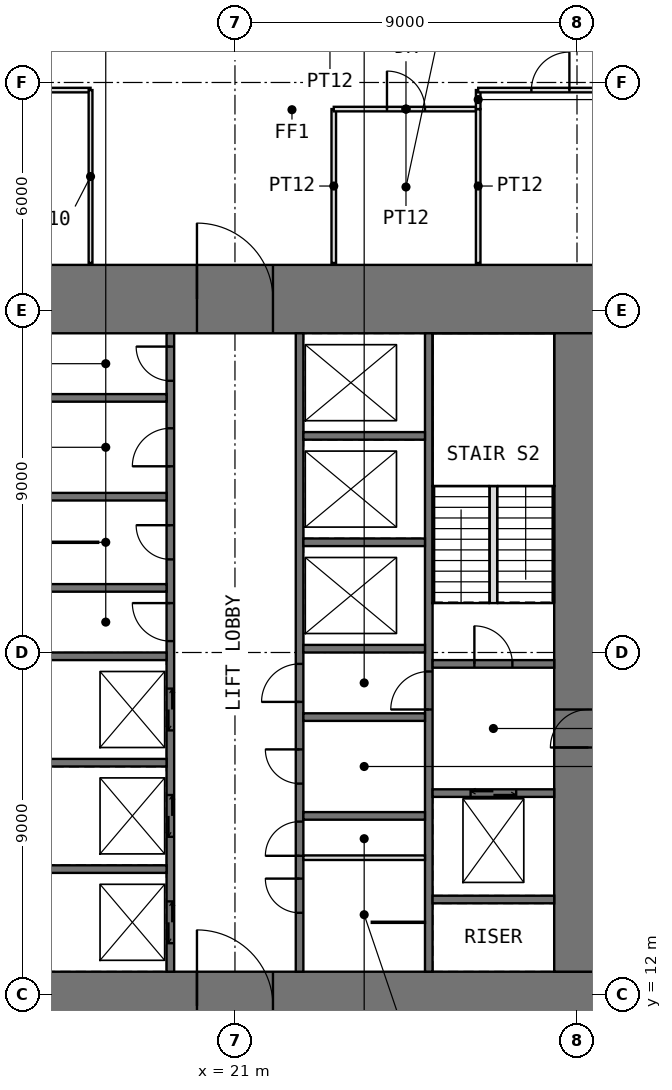
"""IFC4 building model, lengths in metres.
Left out: names, types, materials, properties, quantities, classifications, styles, units other than length and angle.
Written with IfcOpenShell. Run it as: python <this file> out.ifc"""

import sys

from ifc_helpers import new_model, si_unit, direction, frame, frame_2d, origin, place, context, subcontext, project, spatial, rectangle, extrude, element, fill, save


model = new_model("IFC4")
c1 = context("Model", 3, precision=1e-05, world=origin(), true_north=direction((0.0, 1.0)))
c2 = subcontext(c1, "Body", "Model", "MODEL_VIEW")
j1 = project(units=[si_unit("LENGTHUNIT", "METRE"), si_unit("PLANEANGLEUNIT", "RADIAN")], contexts=[c1])
p1 = place(None, origin())
s1 = spatial("IfcSite", under=j1, at=p1, CompositionType="ELEMENT")
p2 = place(p1, origin())
s2 = spatial("IfcBuilding", under=s1, at=p2, CompositionType="ELEMENT")
p3 = place(p2, frame((0.0, 0.0, 82.5)))
s3 = spatial("IfcBuildingStorey", under=s2, at=p3, CompositionType="ELEMENT", Elevation=82.5)
p4 = place(p3, frame((10.8, 11.7, -0.05), z_axis=(0.0, 0.0, 1.0), x_axis=(1.0, 0.0, 0.0)))
e1 = element("IfcWall", 1, at=p4, inside=s3, PredefinedType="SHEAR", context=c2, shape_type="SweptSolid", body=[
    extrude(rectangle(XDim=20.4, YDim=1.8, at=frame_2d((10.2, 0.0))), origin(), (0.0, 0.0, 1.0), 3.8),
])
p5 = place(p4, frame((9.2, 0.0, 0.05)))
e2 = element("IfcOpeningElement", 2, at=p5, cuts=e1, PredefinedType="OPENING", context=c2, shape_type="SweptSolid", body=[
    extrude(rectangle(XDim=2.0, YDim=2.2, at=frame_2d((1.0, 1.1))), frame((0.0, 0.91, 0.0), z_axis=(0.0, -1.0, 0.0), x_axis=(1.0, 0.0, 0.0)), (0.0, 0.0, 1.0), 1.82),
])
p6 = place(p3, frame((10.8, 30.3, -0.05), z_axis=(0.0, 0.0, 1.0), x_axis=(1.0, 0.0, 0.0)))
e3 = element("IfcWall", 3, at=p6, inside=s3, PredefinedType="SHEAR", context=c2, shape_type="SweptSolid", body=[
    extrude(rectangle(XDim=20.4, YDim=1.8, at=frame_2d((10.2, 0.0))), origin(), (0.0, 0.0, 1.0), 3.8),
])
p7 = place(p6, frame((9.2, 0.0, 0.05)))
e4 = element("IfcOpeningElement", 4, at=p7, cuts=e3, PredefinedType="OPENING", context=c2, shape_type="SweptSolid", body=[
    extrude(rectangle(XDim=2.0, YDim=2.2, at=frame_2d((1.0, 1.1))), frame((0.0, 0.91, 0.0), z_axis=(0.0, -1.0, 0.0), x_axis=(1.0, 0.0, 0.0)), (0.0, 0.0, 1.0), 1.82),
])
p8 = place(p3, frame((30.3, 12.6, -0.05), z_axis=(0.0, 0.0, 1.0), x_axis=(0.0, 1.0, 0.0)))
e5 = element("IfcWall", 5, at=p8, inside=s3, PredefinedType="SHEAR", context=c2, shape_type="SweptSolid", body=[
    extrude(rectangle(XDim=16.8, YDim=1.8, at=frame_2d((8.4, 0.0))), origin(), (0.0, 0.0, 1.0), 3.8),
])
p9 = place(p8, frame((5.9, 0.0, 0.05)))
e6 = element("IfcOpeningElement", 6, at=p9, cuts=e5, PredefinedType="OPENING", context=c2, shape_type="SweptSolid", body=[
    extrude(rectangle(XDim=1.0, YDim=2.2, at=frame_2d((0.5, 1.1))), frame((0.0, 0.91, 0.0), z_axis=(0.0, -1.0, 0.0), x_axis=(1.0, 0.0, 0.0)), (0.0, 0.0, 1.0), 1.82),
])
p10 = place(p3, frame((19.3, 12.6, -0.05), z_axis=(0.0, 0.0, 1.0), x_axis=(0.0, 1.0, 0.0)))
e7 = element("IfcWall", 7, at=p10, inside=s3, PredefinedType="SHEAR", context=c2, shape_type="SweptSolid", body=[
    extrude(rectangle(XDim=16.8, YDim=0.2, at=frame_2d((8.4, 0.0))), origin(), (0.0, 0.0, 1.0), 3.8),
])
p11 = place(p10, frame((8.7, 0.0, 0.05)))
e8 = element("IfcOpeningElement", 8, at=p11, cuts=e7, PredefinedType="OPENING", context=c2, shape_type="SweptSolid", body=[
    extrude(rectangle(XDim=1.0, YDim=2.2, at=frame_2d((0.5, 1.1))), frame((0.0, 0.11, 0.0), z_axis=(0.0, -1.0, 0.0), x_axis=(1.0, 0.0, 0.0)), (0.0, 0.0, 1.0), 0.22),
])
p12 = place(p10, frame((10.85, 0.0, 0.05)))
e9 = element("IfcOpeningElement", 9, at=p12, cuts=e7, PredefinedType="OPENING", context=c2, shape_type="SweptSolid", body=[
    extrude(rectangle(XDim=0.9, YDim=2.2, at=frame_2d((0.45, 1.1))), frame((0.0, 0.11, 0.0), z_axis=(0.0, -1.0, 0.0), x_axis=(1.0, 0.0, 0.0)), (0.0, 0.0, 1.0), 0.22),
])
p13 = place(p10, frame((13.3, 0.0, 0.05)))
e10 = element("IfcOpeningElement", 10, at=p13, cuts=e7, PredefinedType="OPENING", context=c2, shape_type="SweptSolid", body=[
    extrude(rectangle(XDim=1.0, YDim=2.2, at=frame_2d((0.5, 1.1))), frame((0.0, 0.11, 0.0), z_axis=(0.0, -1.0, 0.0), x_axis=(1.0, 0.0, 0.0)), (0.0, 0.0, 1.0), 0.22),
])
p14 = place(p10, frame((15.55, 0.0, 0.05)))
e11 = element("IfcOpeningElement", 11, at=p14, cuts=e7, PredefinedType="OPENING", context=c2, shape_type="SweptSolid", body=[
    extrude(rectangle(XDim=0.9, YDim=2.2, at=frame_2d((0.45, 1.1))), frame((0.0, 0.11, 0.0), z_axis=(0.0, -1.0, 0.0), x_axis=(1.0, 0.0, 0.0)), (0.0, 0.0, 1.0), 0.22),
])
p15 = place(p10, frame((0.75, 0.0, 0.05)))
e12 = element("IfcOpeningElement", 12, at=p15, cuts=e7, PredefinedType="OPENING", context=c2, shape_type="SweptSolid", body=[
    extrude(rectangle(XDim=1.1, YDim=2.2, at=frame_2d((0.55, 1.1))), frame((0.0, 0.11, 0.0), z_axis=(0.0, -1.0, 0.0), x_axis=(1.0, 0.0, 0.0)), (0.0, 0.0, 1.0), 0.22),
])
p16 = place(p10, frame((3.55, 0.0, 0.05)))
e13 = element("IfcOpeningElement", 13, at=p16, cuts=e7, PredefinedType="OPENING", context=c2, shape_type="SweptSolid", body=[
    extrude(rectangle(XDim=1.1, YDim=2.2, at=frame_2d((0.55, 1.1))), frame((0.0, 0.11, 0.0), z_axis=(0.0, -1.0, 0.0), x_axis=(1.0, 0.0, 0.0)), (0.0, 0.0, 1.0), 0.22),
])
p17 = place(p10, frame((6.35, 0.0, 0.05)))
e14 = element("IfcOpeningElement", 14, at=p17, cuts=e7, PredefinedType="OPENING", context=c2, shape_type="SweptSolid", body=[
    extrude(rectangle(XDim=1.1, YDim=2.2, at=frame_2d((0.55, 1.1))), frame((0.0, 0.11, 0.0), z_axis=(0.0, -1.0, 0.0), x_axis=(1.0, 0.0, 0.0)), (0.0, 0.0, 1.0), 0.22),
])
p18 = place(p3, frame((22.7, 12.6, -0.05), z_axis=(0.0, 0.0, 1.0), x_axis=(0.0, 1.0, 0.0)))
e15 = element("IfcWall", 15, at=p18, inside=s3, PredefinedType="SHEAR", context=c2, shape_type="SweptSolid", body=[
    extrude(rectangle(XDim=16.8, YDim=0.2, at=frame_2d((8.4, 0.0))), origin(), (0.0, 0.0, 1.0), 3.8),
])
p19 = place(p18, frame((3.05, 0.0, 0.05)))
e16 = element("IfcOpeningElement", 16, at=p19, cuts=e15, PredefinedType="OPENING", context=c2, shape_type="SweptSolid", body=[
    extrude(rectangle(XDim=0.9, YDim=2.2, at=frame_2d((0.45, 1.1))), frame((0.0, 0.11, 0.0), z_axis=(0.0, -1.0, 0.0), x_axis=(1.0, 0.0, 0.0)), (0.0, 0.0, 1.0), 0.22),
])
p20 = place(p18, frame((7.1, 0.0, 0.05)))
e17 = element("IfcOpeningElement", 17, at=p20, cuts=e15, PredefinedType="OPENING", context=c2, shape_type="SweptSolid", body=[
    extrude(rectangle(XDim=1.0, YDim=2.2, at=frame_2d((0.5, 1.1))), frame((0.0, 0.11, 0.0), z_axis=(0.0, -1.0, 0.0), x_axis=(1.0, 0.0, 0.0)), (0.0, 0.0, 1.0), 0.22),
])
p21 = place(p18, frame((1.55, 0.0, 0.05)))
e18 = element("IfcOpeningElement", 18, at=p21, cuts=e15, PredefinedType="OPENING", context=c2, shape_type="SweptSolid", body=[
    extrude(rectangle(XDim=0.9, YDim=2.2, at=frame_2d((0.45, 1.1))), frame((0.0, 0.11, 0.0), z_axis=(0.0, -1.0, 0.0), x_axis=(1.0, 0.0, 0.0)), (0.0, 0.0, 1.0), 0.22),
])
p22 = place(p18, frame((4.95, 0.0, 0.05)))
e19 = element("IfcOpeningElement", 19, at=p22, cuts=e15, PredefinedType="OPENING", context=c2, shape_type="SweptSolid", body=[
    extrude(rectangle(XDim=0.9, YDim=2.2, at=frame_2d((0.45, 1.1))), frame((0.0, 0.11, 0.0), z_axis=(0.0, -1.0, 0.0), x_axis=(1.0, 0.0, 0.0)), (0.0, 0.0, 1.0), 0.22),
])
p23 = place(p3, frame((26.1, 12.6, -0.05), z_axis=(0.0, 0.0, 1.0), x_axis=(0.0, 1.0, 0.0)))
e20 = element("IfcWall", 20, at=p23, inside=s3, PredefinedType="SHEAR", context=c2, shape_type="SweptSolid", body=[
    extrude(rectangle(XDim=16.8, YDim=0.2, at=frame_2d((8.4, 0.0))), origin(), (0.0, 0.0, 1.0), 3.8),
])
p24 = place(p23, frame((6.9, 0.0, 0.05)))
e21 = element("IfcOpeningElement", 21, at=p24, cuts=e20, PredefinedType="OPENING", context=c2, shape_type="SweptSolid", body=[
    extrude(rectangle(XDim=1.0, YDim=2.2, at=frame_2d((0.5, 1.1))), frame((0.0, 0.11, 0.0), z_axis=(0.0, -1.0, 0.0), x_axis=(1.0, 0.0, 0.0)), (0.0, 0.0, 1.0), 0.22),
])
for number, where, z_axis, x_axis in (
    (22, (16.0, 15.3, -0.05), (0.0, 0.0, 1.0), (1.0, 0.0, 0.0)),
    (23, (16.0, 18.1, -0.05), (0.0, 0.0, 1.0), (1.0, 0.0, 0.0)),
    (24, (16.0, 20.9, -0.05), (0.0, 0.0, 1.0), (1.0, 0.0, 0.0)),
    (25, (16.0, 22.7, -0.05), (0.0, 0.0, 1.0), (1.0, 0.0, 0.0)),
    (26, (16.0, 25.1, -0.05), (0.0, 0.0, 1.0), (1.0, 0.0, 0.0)),
    (27, (16.0, 27.7, -0.05), (0.0, 0.0, 1.0), (1.0, 0.0, 0.0)),
    (28, (22.8, 16.7, -0.05), (0.0, 0.0, 1.0), (1.0, 0.0, 0.0)),
    (29, (22.8, 19.3, -0.05), (0.0, 0.0, 1.0), (1.0, 0.0, 0.0)),
    (30, (22.8, 21.1, -0.05), (0.0, 0.0, 1.0), (1.0, 0.0, 0.0)),
    (31, (22.8, 23.9, -0.05), (0.0, 0.0, 1.0), (1.0, 0.0, 0.0)),
    (32, (22.8, 26.7, -0.05), (0.0, 0.0, 1.0), (1.0, 0.0, 0.0)),
    (33, (26.2, 14.5, -0.05), (0.0, 0.0, 1.0), (1.0, 0.0, 0.0)),
):
    element("IfcWall", number, at=place(p3, frame(where, z_axis=z_axis, x_axis=x_axis)), inside=s3, PredefinedType="SHEAR", context=c2, shape_type="SweptSolid", body=[
        extrude(rectangle(XDim=3.2, YDim=0.2, at=frame_2d((1.6, 0.0))), origin(), (0.0, 0.0, 1.0), 3.8),
    ])
p25 = place(p3, frame((26.2, 17.3, -0.05), z_axis=(0.0, 0.0, 1.0), x_axis=(1.0, 0.0, 0.0)))
e34 = element("IfcWall", 34, at=p25, inside=s3, PredefinedType="SHEAR", context=c2, shape_type="SweptSolid", body=[
    extrude(rectangle(XDim=3.2, YDim=0.2, at=frame_2d((1.6, 0.0))), origin(), (0.0, 0.0, 1.0), 3.8),
])
p26 = place(p25, frame((1.0, 0.0, 0.05)))
e35 = element("IfcOpeningElement", 35, at=p26, cuts=e34, PredefinedType="OPENING", context=c2, shape_type="SweptSolid", body=[
    extrude(rectangle(XDim=1.2, YDim=2.2, at=frame_2d((0.6, 1.1))), frame((0.0, 0.11, 0.0), z_axis=(0.0, -1.0, 0.0), x_axis=(1.0, 0.0, 0.0)), (0.0, 0.0, 1.0), 0.22),
])
p27 = place(p3, frame((26.2, 20.7, -0.05), z_axis=(0.0, 0.0, 1.0), x_axis=(1.0, 0.0, 0.0)))
e36 = element("IfcWall", 36, at=p27, inside=s3, PredefinedType="SHEAR", context=c2, shape_type="SweptSolid", body=[
    extrude(rectangle(XDim=3.2, YDim=0.2, at=frame_2d((1.6, 0.0))), origin(), (0.0, 0.0, 1.0), 3.8),
])
p28 = place(p27, frame((1.1, 0.0, 0.05)))
e37 = element("IfcOpeningElement", 37, at=p28, cuts=e36, PredefinedType="OPENING", context=c2, shape_type="SweptSolid", body=[
    extrude(rectangle(XDim=1.0, YDim=2.2, at=frame_2d((0.5, 1.1))), frame((0.0, 0.11, 0.0), z_axis=(0.0, -1.0, 0.0), x_axis=(1.0, 0.0, 0.0)), (0.0, 0.0, 1.0), 0.22),
])
p29 = place(p3, frame((22.8, 15.6, 0.0), z_axis=(0.0, 0.0, 1.0), x_axis=(1.0, 0.0, 0.0)))
e38 = element("IfcWall", 38, at=p29, inside=s3, PredefinedType="PARTITIONING", context=c2, shape_type="SweptSolid", body=[
    extrude(rectangle(XDim=3.2, YDim=0.12, at=frame_2d((1.6, 0.0))), origin(), (0.0, 0.0, 1.0), 3.55),
])
for number, where, z_axis, x_axis in (
    (39, (24.6, 13.9, 0.0), (0.0, 0.0, 1.0), (1.0, 0.0, 0.0)),
    (40, (16.0, 23.9, 0.0), (0.0, 0.0, 1.0), (1.0, 0.0, 0.0)),
):
    element("IfcWall", number, at=place(p3, frame(where, z_axis=z_axis, x_axis=x_axis)), inside=s3, PredefinedType="PARTITIONING", context=c2, shape_type="SweptSolid", body=[
        extrude(rectangle(XDim=1.4, YDim=0.03, at=frame_2d((0.7, 0.0))), origin(), (0.0, 0.0, 1.0), 3.55),
    ])
p30 = place(p3, frame((14.0, 35.8, 0.0), z_axis=(0.0, 0.0, 1.0), x_axis=(1.0, 0.0, 0.0)))
e41 = element("IfcWall", 41, at=p30, inside=s3, PredefinedType="PARTITIONING", context=c2, shape_type="SweptSolid", body=[
    extrude(rectangle(XDim=3.2, YDim=0.12, at=frame_2d((1.6, 0.0))), origin(), (0.0, 0.0, 1.0), 3.55),
])
p31 = place(p30, frame((1.1, 0.0, 0.0)))
e42 = element("IfcOpeningElement", 42, at=p31, cuts=e41, PredefinedType="OPENING", context=c2, shape_type="SweptSolid", body=[
    extrude(rectangle(XDim=1.0, YDim=2.4, at=frame_2d((0.5, 1.2))), frame((0.0, 0.07, 0.0), z_axis=(0.0, -1.0, 0.0), x_axis=(1.0, 0.0, 0.0)), (0.0, 0.0, 1.0), 0.14),
])
p32 = place(p3, frame((17.2, 31.25, 0.0), z_axis=(0.0, 0.0, 1.0), x_axis=(0.0, 1.0, 0.0)))
e43 = element("IfcWall", 43, at=p32, inside=s3, PredefinedType="PARTITIONING", context=c2, shape_type="SweptSolid", body=[
    extrude(rectangle(XDim=4.55, YDim=0.1, at=frame_2d((2.275, 0.0))), origin(), (0.0, 0.0, 1.0), 3.55),
])
p33 = place(p3, frame((23.6, 31.25, 0.0), z_axis=(0.0, 0.0, 1.0), x_axis=(0.0, 1.0, 0.0)))
e44 = element("IfcWall", 44, at=p33, inside=s3, PredefinedType="PARTITIONING", context=c2, shape_type="SweptSolid", body=[
    extrude(rectangle(XDim=4.05, YDim=0.12, at=frame_2d((2.025, 0.0))), origin(), (0.0, 0.0, 1.0), 3.55),
])
p34 = place(p3, frame((23.6, 35.3, 0.0), z_axis=(0.0, 0.0, 1.0), x_axis=(1.0, 0.0, 0.0)))
e45 = element("IfcWall", 45, at=p34, inside=s3, PredefinedType="PARTITIONING", context=c2, shape_type="SweptSolid", body=[
    extrude(rectangle(XDim=3.8, YDim=0.12, at=frame_2d((1.9, 0.0))), origin(), (0.0, 0.0, 1.0), 3.55),
])
p35 = place(p34, frame((1.4, 0.0, 0.0)))
e46 = element("IfcOpeningElement", 46, at=p35, cuts=e45, PredefinedType="OPENING", context=c2, shape_type="SweptSolid", body=[
    extrude(rectangle(XDim=1.0, YDim=2.2, at=frame_2d((0.5, 1.1))), frame((0.0, 0.07, 0.0), z_axis=(0.0, -1.0, 0.0), x_axis=(1.0, 0.0, 0.0)), (0.0, 0.0, 1.0), 0.14),
])
p36 = place(p3, frame((27.4, 31.25, 0.0), z_axis=(0.0, 0.0, 1.0), x_axis=(0.0, 1.0, 0.0)))
e47 = element("IfcWall", 47, at=p36, inside=s3, PredefinedType="PARTITIONING", context=c2, shape_type="SweptSolid", body=[
    extrude(rectangle(XDim=4.05, YDim=0.12, at=frame_2d((2.025, 0.0))), origin(), (0.0, 0.0, 1.0), 3.55),
])
p37 = place(p3, frame((27.4, 35.3, 0.0), z_axis=(0.0, 0.0, 1.0), x_axis=(0.0, 1.0, 0.0)))
e48 = element("IfcWall", 48, at=p37, inside=s3, PredefinedType="PARTITIONING", context=c2, shape_type="SweptSolid", body=[
    extrude(rectangle(XDim=0.5, YDim=0.12, at=frame_2d((0.25, 0.0))), origin(), (0.0, 0.0, 1.0), 3.55),
])
p38 = place(p3, frame((27.4, 35.8, 0.0), z_axis=(0.0, 0.0, 1.0), x_axis=(1.0, 0.0, 0.0)))
e49 = element("IfcWall", 49, at=p38, inside=s3, PredefinedType="PARTITIONING", context=c2, shape_type="SweptSolid", body=[
    extrude(rectangle(XDim=3.8, YDim=0.12, at=frame_2d((1.9, 0.0))), origin(), (0.0, 0.0, 1.0), 3.55),
])
p39 = place(p38, frame((1.4, 0.0, 0.0)))
e50 = element("IfcOpeningElement", 50, at=p39, cuts=e49, PredefinedType="OPENING", context=c2, shape_type="SweptSolid", body=[
    extrude(rectangle(XDim=1.0, YDim=2.4, at=frame_2d((0.5, 1.2))), frame((0.0, 0.07, 0.0), z_axis=(0.0, -1.0, 0.0), x_axis=(1.0, 0.0, 0.0)), (0.0, 0.0, 1.0), 0.14),
])
p40 = place(p3, frame((27.8, 22.3, 0.0), z_axis=(0.0, 0.0, 1.0), x_axis=(0.0, 1.0, 0.0)))
e51 = element("IfcWall", 51, at=p40, inside=s3, PredefinedType="PARTITIONING", context=c2, shape_type="SweptSolid", body=[
    extrude(rectangle(XDim=3.08, YDim=0.2, at=frame_2d((1.54, 0.0))), origin(), (0.0, 0.0, 1.0), 4.0),
])
p41 = place(p5, origin())
e52 = element("IfcDoor", 52, at=p41, inside=s3, OperationType="DOUBLE_DOOR_SINGLE_SWING", PredefinedType="DOOR", context=c2, shape_type="SweptSolid", body=[
    extrude(rectangle(XDim=2.0, YDim=2.2, at=frame_2d((1.0, 1.1))), frame((0.0, 0.025, 0.0), z_axis=(0.0, -1.0, 0.0), x_axis=(1.0, 0.0, 0.0)), (0.0, 0.0, 1.0), 0.05),
])
fill(e2, e52)
p42 = place(p7, origin())
e53 = element("IfcDoor", 53, at=p42, inside=s3, OperationType="DOUBLE_DOOR_SINGLE_SWING", PredefinedType="DOOR", context=c2, shape_type="SweptSolid", body=[
    extrude(rectangle(XDim=2.0, YDim=2.2, at=frame_2d((1.0, 1.1))), frame((0.0, 0.025, 0.0), z_axis=(0.0, -1.0, 0.0), x_axis=(1.0, 0.0, 0.0)), (0.0, 0.0, 1.0), 0.05),
])
fill(e4, e53)
p43 = place(p19, origin())
e54 = element("IfcDoor", 54, at=p43, inside=s3, OperationType="SINGLE_SWING_LEFT", PredefinedType="DOOR", context=c2, shape_type="SweptSolid", body=[
    extrude(rectangle(XDim=0.9, YDim=2.2, at=frame_2d((0.45, 1.1))), frame((0.0, 0.025, 0.0), z_axis=(0.0, -1.0, 0.0), x_axis=(1.0, 0.0, 0.0)), (0.0, 0.0, 1.0), 0.05),
])
fill(e16, e54)
p44 = place(p9, origin())
e55 = element("IfcDoor", 55, at=p44, inside=s3, OperationType="SINGLE_SWING_LEFT", PredefinedType="DOOR", context=c2, shape_type="SweptSolid", body=[
    extrude(rectangle(XDim=1.0, YDim=2.2, at=frame_2d((0.5, 1.1))), frame((0.0, 0.025, 0.0), z_axis=(0.0, -1.0, 0.0), x_axis=(1.0, 0.0, 0.0)), (0.0, 0.0, 1.0), 0.05),
])
fill(e6, e55)
p45 = place(p28, origin())
e56 = element("IfcDoor", 56, at=p45, inside=s3, OperationType="SINGLE_SWING_LEFT", PredefinedType="DOOR", context=c2, shape_type="SweptSolid", body=[
    extrude(rectangle(XDim=1.0, YDim=2.2, at=frame_2d((0.5, 1.1))), frame((0.0, 0.025, 0.0), z_axis=(0.0, -1.0, 0.0), x_axis=(1.0, 0.0, 0.0)), (0.0, 0.0, 1.0), 0.05),
])
fill(e37, e56)
p46 = place(p24, origin())
e57 = element("IfcDoor", 57, at=p46, inside=s3, OperationType="SINGLE_SWING_LEFT", PredefinedType="DOOR", context=c2, shape_type="SweptSolid", body=[
    extrude(rectangle(XDim=1.0, YDim=2.2, at=frame_2d((0.5, 1.1))), frame((0.0, 0.025, 0.0), z_axis=(0.0, -1.0, 0.0), x_axis=(1.0, 0.0, 0.0)), (0.0, 0.0, 1.0), 0.05),
])
fill(e21, e57)
p47 = place(p11, origin())
e58 = element("IfcDoor", 58, at=p47, inside=s3, OperationType="SINGLE_SWING_RIGHT", PredefinedType="DOOR", context=c2, shape_type="SweptSolid", body=[
    extrude(rectangle(XDim=1.0, YDim=2.2, at=frame_2d((0.5, 1.1))), frame((0.0, 0.025, 0.0), z_axis=(0.0, -1.0, 0.0), x_axis=(1.0, 0.0, 0.0)), (0.0, 0.0, 1.0), 0.05),
])
fill(e8, e58)
p48 = place(p20, origin())
e59 = element("IfcDoor", 59, at=p48, inside=s3, OperationType="SINGLE_SWING_LEFT", PredefinedType="DOOR", context=c2, shape_type="SweptSolid", body=[
    extrude(rectangle(XDim=1.0, YDim=2.2, at=frame_2d((0.5, 1.1))), frame((0.0, 0.025, 0.0), z_axis=(0.0, -1.0, 0.0), x_axis=(1.0, 0.0, 0.0)), (0.0, 0.0, 1.0), 0.05),
])
fill(e17, e59)
p49 = place(p12, origin())
e60 = element("IfcDoor", 60, at=p49, inside=s3, OperationType="SINGLE_SWING_RIGHT", PredefinedType="DOOR", context=c2, shape_type="SweptSolid", body=[
    extrude(rectangle(XDim=0.9, YDim=2.2, at=frame_2d((0.45, 1.1))), frame((0.0, 0.025, 0.0), z_axis=(0.0, -1.0, 0.0), x_axis=(1.0, 0.0, 0.0)), (0.0, 0.0, 1.0), 0.05),
])
fill(e9, e60)
p50 = place(p13, origin())
e61 = element("IfcDoor", 61, at=p50, inside=s3, OperationType="SINGLE_SWING_LEFT", PredefinedType="DOOR", context=c2, shape_type="SweptSolid", body=[
    extrude(rectangle(XDim=1.0, YDim=2.2, at=frame_2d((0.5, 1.1))), frame((0.0, 0.025, 0.0), z_axis=(0.0, -1.0, 0.0), x_axis=(1.0, 0.0, 0.0)), (0.0, 0.0, 1.0), 0.05),
])
fill(e10, e61)
p51 = place(p14, origin())
e62 = element("IfcDoor", 62, at=p51, inside=s3, OperationType="SINGLE_SWING_RIGHT", PredefinedType="DOOR", context=c2, shape_type="SweptSolid", body=[
    extrude(rectangle(XDim=0.9, YDim=2.2, at=frame_2d((0.45, 1.1))), frame((0.0, 0.025, 0.0), z_axis=(0.0, -1.0, 0.0), x_axis=(1.0, 0.0, 0.0)), (0.0, 0.0, 1.0), 0.05),
])
fill(e11, e62)
p52 = place(p21, origin())
e63 = element("IfcDoor", 63, at=p52, inside=s3, OperationType="SINGLE_SWING_RIGHT", PredefinedType="DOOR", context=c2, shape_type="SweptSolid", body=[
    extrude(rectangle(XDim=0.9, YDim=2.2, at=frame_2d((0.45, 1.1))), frame((0.0, 0.025, 0.0), z_axis=(0.0, -1.0, 0.0), x_axis=(1.0, 0.0, 0.0)), (0.0, 0.0, 1.0), 0.05),
])
fill(e18, e63)
p53 = place(p22, origin())
e64 = element("IfcDoor", 64, at=p53, inside=s3, OperationType="SINGLE_SWING_RIGHT", PredefinedType="DOOR", context=c2, shape_type="SweptSolid", body=[
    extrude(rectangle(XDim=0.9, YDim=2.2, at=frame_2d((0.45, 1.1))), frame((0.0, 0.025, 0.0), z_axis=(0.0, -1.0, 0.0), x_axis=(1.0, 0.0, 0.0)), (0.0, 0.0, 1.0), 0.05),
])
fill(e19, e64)
p54 = place(p35, origin())
e65 = element("IfcDoor", 65, at=p54, inside=s3, OperationType="SINGLE_SWING_LEFT", PredefinedType="DOOR", context=c2, shape_type="SweptSolid", body=[
    extrude(rectangle(XDim=1.0, YDim=2.2, at=frame_2d((0.5, 1.1))), frame((0.0, 0.025, 0.0), z_axis=(0.0, -1.0, 0.0), x_axis=(1.0, 0.0, 0.0)), (0.0, 0.0, 1.0), 0.05),
])
fill(e46, e65)
p55 = place(p39, origin())
e66 = element("IfcDoor", 66, at=p55, inside=s3, OperationType="SINGLE_SWING_RIGHT", PredefinedType="DOOR", context=c2, shape_type="SweptSolid", body=[
    extrude(rectangle(XDim=1.0, YDim=2.4, at=frame_2d((0.5, 1.2))), frame((0.0, 0.025, 0.0), z_axis=(0.0, -1.0, 0.0), x_axis=(1.0, 0.0, 0.0)), (0.0, 0.0, 1.0), 0.05),
])
fill(e50, e66)
p56 = place(p15, origin())
e67 = element("IfcDoor", 67, at=p56, inside=s3, OperationType="DOUBLE_DOOR_SLIDING", PredefinedType="DOOR", context=c2, shape_type="SweptSolid", body=[
    extrude(rectangle(XDim=1.1, YDim=2.2, at=frame_2d((0.55, 1.1))), frame((0.0, 0.025, 0.0), z_axis=(0.0, -1.0, 0.0), x_axis=(1.0, 0.0, 0.0)), (0.0, 0.0, 1.0), 0.05),
])
fill(e12, e67)
p57 = place(p16, origin())
e68 = element("IfcDoor", 68, at=p57, inside=s3, OperationType="DOUBLE_DOOR_SLIDING", PredefinedType="DOOR", context=c2, shape_type="SweptSolid", body=[
    extrude(rectangle(XDim=1.1, YDim=2.2, at=frame_2d((0.55, 1.1))), frame((0.0, 0.025, 0.0), z_axis=(0.0, -1.0, 0.0), x_axis=(1.0, 0.0, 0.0)), (0.0, 0.0, 1.0), 0.05),
])
fill(e13, e68)
p58 = place(p17, origin())
e69 = element("IfcDoor", 69, at=p58, inside=s3, OperationType="DOUBLE_DOOR_SLIDING", PredefinedType="DOOR", context=c2, shape_type="SweptSolid", body=[
    extrude(rectangle(XDim=1.1, YDim=2.2, at=frame_2d((0.55, 1.1))), frame((0.0, 0.025, 0.0), z_axis=(0.0, -1.0, 0.0), x_axis=(1.0, 0.0, 0.0)), (0.0, 0.0, 1.0), 0.05),
])
fill(e14, e69)
p59 = place(p26, origin())
e70 = element("IfcDoor", 70, at=p59, inside=s3, OperationType="DOUBLE_DOOR_SLIDING", PredefinedType="DOOR", context=c2, shape_type="SweptSolid", body=[
    extrude(rectangle(XDim=1.2, YDim=2.2, at=frame_2d((0.6, 1.1))), frame((0.0, 0.025, 0.0), z_axis=(0.0, -1.0, 0.0), x_axis=(1.0, 0.0, 0.0)), (0.0, 0.0, 1.0), 0.05),
])
fill(e35, e70)
save(model, sys.argv[1])
